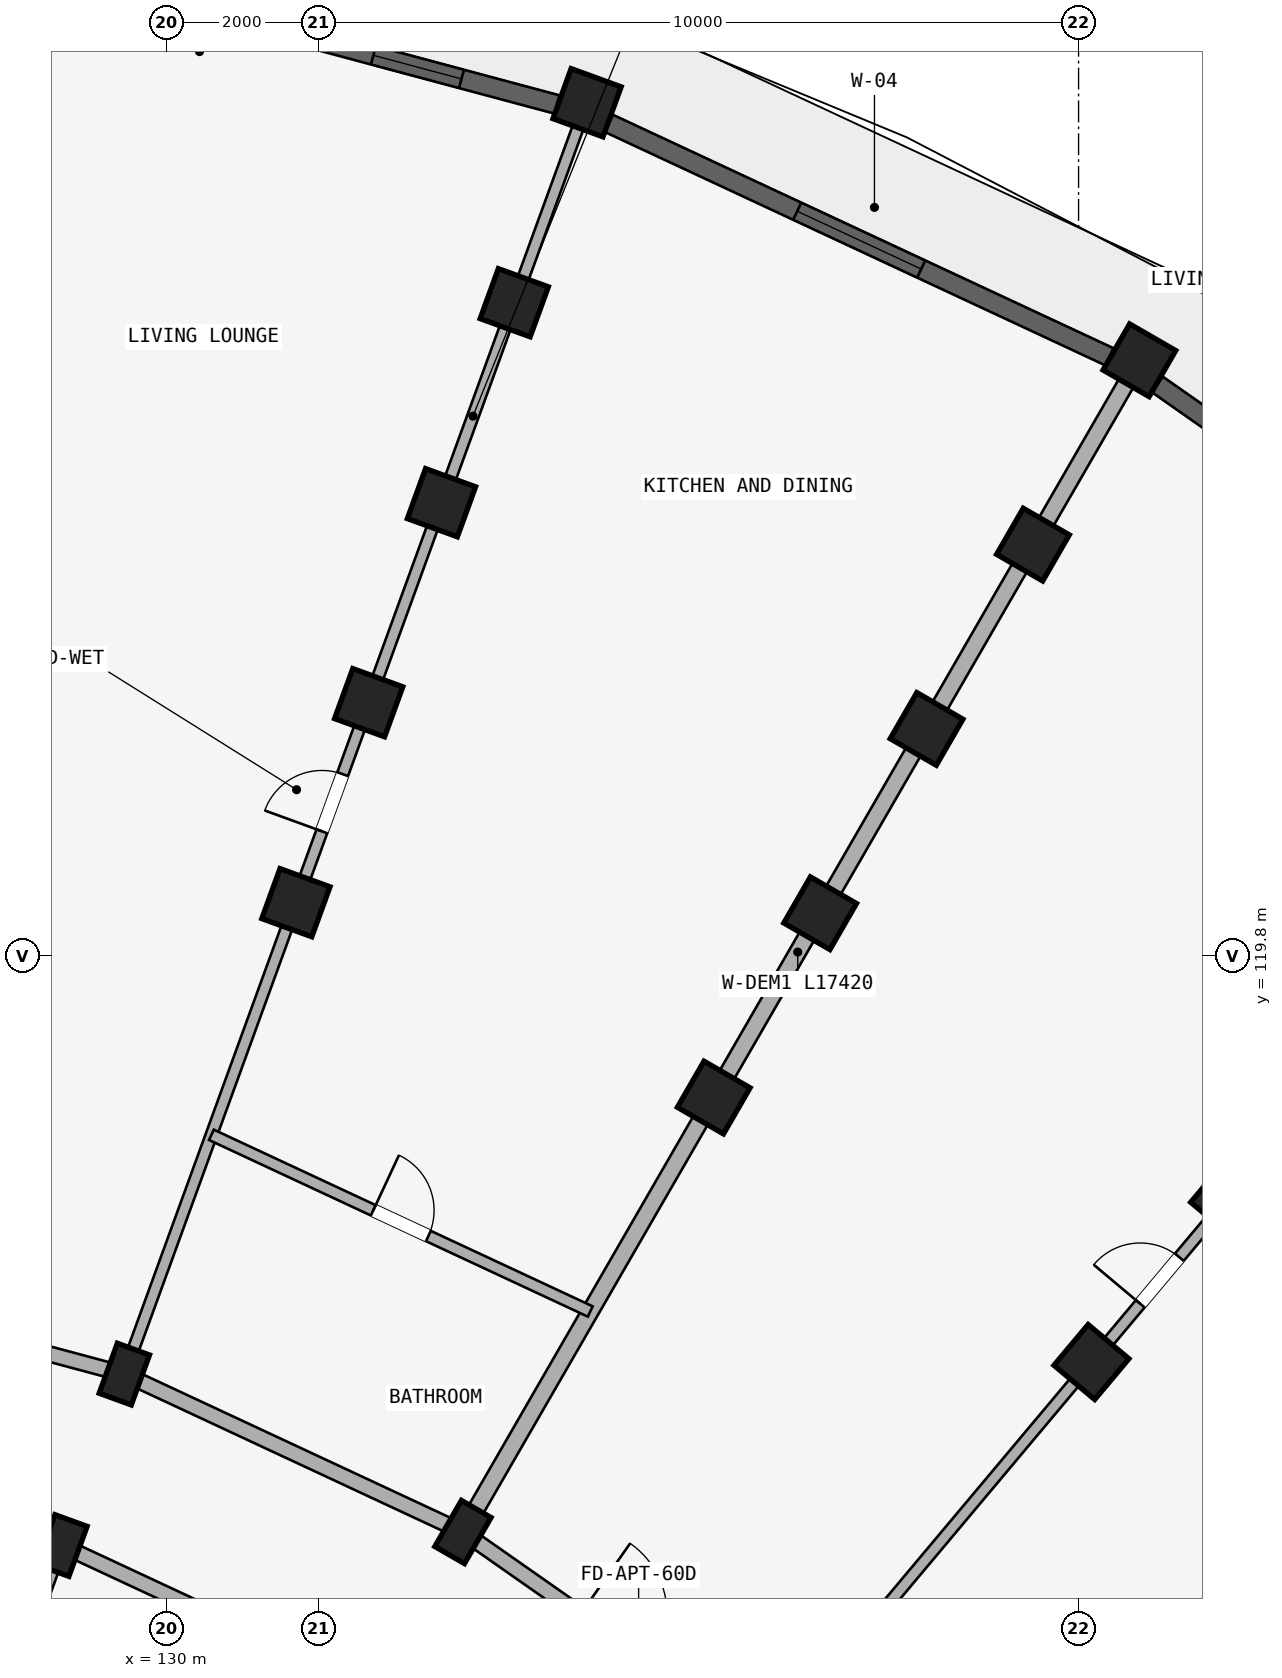
"""IFC4 building model, lengths in metres.
Left out: names, types, materials, properties, quantities, classifications, styles, units other than length and angle.
Written with IfcOpenShell. Run it as: python <this file> out.ifc"""

import sys

from ifc_helpers import new_model, si_unit, direction, frame, frame_2d, origin, origin_2d, place, context, subcontext, project, spatial, rectangle, extrude, element, fill, save


model = new_model("IFC4")
c1 = context("Model", 3, precision=1e-05, world=origin(), true_north=direction((0.0, 1.0)))
c2 = subcontext(c1, "Body", "Model", "MODEL_VIEW")
j1 = project(units=[si_unit("LENGTHUNIT", "METRE"), si_unit("PLANEANGLEUNIT", "RADIAN")], contexts=[c1])
p1 = place(None, origin())
s1 = spatial("IfcSite", under=j1, at=p1, CompositionType="ELEMENT")
p2 = place(p1, origin())
s2 = spatial("IfcBuilding", under=s1, at=p2, CompositionType="ELEMENT")
p3 = place(p2, frame((0.0, 0.0, 24.45)))
s3 = spatial("IfcBuildingStorey", under=s2, at=p3, CompositionType="ELEMENT", Elevation=24.45)
for number, where, z_axis, x_axis in (
    (1, (128.624, 112.044, 0.0), (0.0, 0.0, 1.0), (-0.94, 0.342, 0.0)),
    (2, (129.445, 114.299, 0.0), (0.0, 0.0, 1.0), (-0.94, 0.342, 0.0)),
):
    element("IfcColumn", number, at=place(p3, frame(where, z_axis=z_axis, x_axis=x_axis)), inside=s3, PredefinedType="COLUMN", context=c2, shape_type="SweptSolid", body=[
        extrude(rectangle(XDim=0.45, YDim=0.7, at=origin_2d()), origin(), (0.0, 0.0, 1.0), 2.93),
    ])
for number, where, z_axis, x_axis in (
    (3, (131.702, 120.501, 0.0), (0.0, 0.0, 1.0), (-0.94, 0.342, 0.0)),
    (4, (132.66, 123.132, 0.0), (0.0, 0.0, 1.0), (-0.94, 0.342, 0.0)),
    (5, (133.618, 125.764, 0.0), (0.0, 0.0, 1.0), (-0.94, 0.342, 0.0)),
    (6, (134.575, 128.395, 0.0), (0.0, 0.0, 1.0), (-0.94, 0.342, 0.0)),
    (7, (135.533, 131.026, 0.0), (0.0, 0.0, 1.0), (-0.94, 0.342, 0.0)),
):
    element("IfcColumn", number, at=place(p3, frame(where, z_axis=z_axis, x_axis=x_axis)), inside=s3, PredefinedType="COLUMN", context=c2, shape_type="SweptSolid", body=[
        extrude(rectangle(XDim=0.7, YDim=0.7, at=origin_2d()), origin(), (0.0, 0.0, 1.0), 2.93),
    ])
p4 = place(p3, frame((133.9, 112.222, 0.0), z_axis=(0.0, 0.0, 1.0), x_axis=(-0.866025403784, 0.5, 0.0)))
e8 = element("IfcColumn", 8, at=p4, inside=s3, PredefinedType="COLUMN", context=c2, shape_type="SweptSolid", body=[
    extrude(rectangle(XDim=0.45, YDim=0.7, at=origin_2d()), origin(), (0.0, 0.0, 1.0), 2.93),
])
for number, where, z_axis, x_axis in (
    (9, (137.2, 117.938, 0.0), (0.0, 0.0, 1.0), (-0.866, 0.5, 0.0)),
    (10, (138.6, 120.363, 0.0), (0.0, 0.0, 1.0), (-0.866, 0.5, 0.0)),
    (11, (140.0, 122.787, 0.0), (0.0, 0.0, 1.0), (-0.866, 0.5, 0.0)),
    (12, (141.4, 125.212, 0.0), (0.0, 0.0, 1.0), (-0.866, 0.5, 0.0)),
    (13, (142.8, 127.637, 0.0), (0.0, 0.0, 1.0), (-0.866, 0.5, 0.0)),
    (14, (142.169, 114.458, 0.0), (0.0, 0.0, 1.0), (-0.766, 0.643, 0.0)),
    (15, (143.969, 116.603, 0.0), (0.0, 0.0, 1.0), (-0.766, 0.643, 0.0)),
):
    element("IfcColumn", number, at=place(p3, frame(where, z_axis=z_axis, x_axis=x_axis)), inside=s3, PredefinedType="COLUMN", context=c2, shape_type="SweptSolid", body=[
        extrude(rectangle(XDim=0.7, YDim=0.7, at=origin_2d()), origin(), (0.0, 0.0, 1.0), 2.93),
    ])
p5 = place(p3, frame((124.28, 113.208, 0.0), z_axis=(0.0, 0.0, 1.0), x_axis=(0.965934240054, -0.258787642463, 0.0)))
e16 = element("IfcWall", 16, at=p5, inside=s3, PredefinedType="STANDARD", context=c2, shape_type="SweptSolid", body=[
    extrude(rectangle(XDim=4.497, YDim=0.2, at=frame_2d((2.249, 0.0))), origin(), (0.0, 0.0, 1.0), 2.372),
])
p6 = place(p3, frame((124.697, 115.572, 0.0), z_axis=(0.0, 0.0, 1.0), x_axis=(0.965930095386, -0.258803112091, 0.0)))
e17 = element("IfcWall", 17, at=p6, inside=s3, PredefinedType="STANDARD", context=c2, shape_type="SweptSolid", body=[
    extrude(rectangle(XDim=4.916, YDim=0.2, at=frame_2d((2.458, 0.0))), origin(), (0.0, 0.0, 1.0), 2.372),
])
p7 = place(p6, frame((1.918, 0.0, 0.0)))
e18 = element("IfcOpeningElement", 18, at=p7, cuts=e17, PredefinedType="OPENING", context=c2, shape_type="SweptSolid", body=[
    extrude(rectangle(XDim=1.08, YDim=2.15, at=frame_2d((0.54, 1.075))), frame((0.0, 0.11, 0.0), z_axis=(0.0, -1.0, 0.0), x_axis=(1.0, 0.0, 0.0)), (0.0, 0.0, 1.0), 0.22),
])
p8 = place(p3, frame((128.624, 112.044, 0.0), z_axis=(0.0, 0.0, 1.0), x_axis=(0.906307919131, -0.422617978463, 0.0)))
e19 = element("IfcWall", 19, at=p8, inside=s3, PredefinedType="STANDARD", context=c2, shape_type="SweptSolid", body=[
    extrude(rectangle(XDim=4.497, YDim=0.2, at=frame_2d((2.249, 0.0))), origin(), (0.0, 0.0, 1.0), 2.372),
])
p9 = place(p3, frame((129.445, 114.299, 0.0), z_axis=(0.0, 0.0, 1.0), x_axis=(0.906302381024, -0.422629854778, 0.0)))
e20 = element("IfcWall", 20, at=p9, inside=s3, PredefinedType="STANDARD", context=c2, shape_type="SweptSolid", body=[
    extrude(rectangle(XDim=4.915, YDim=0.2, at=frame_2d((2.458, 0.0))), origin(), (0.0, 0.0, 1.0), 2.372),
])
p10 = place(p3, frame((133.9, 112.222, 0.0), z_axis=(0.0, 0.0, 1.0), x_axis=(0.819140911474, -0.573592335331, 0.0)))
e21 = element("IfcWall", 21, at=p10, inside=s3, PredefinedType="STANDARD", context=c2, shape_type="SweptSolid", body=[
    extrude(rectangle(XDim=4.916, YDim=0.2, at=frame_2d((2.458, 0.0))), origin(), (0.0, 0.0, 1.0), 2.372),
])
p11 = place(p10, frame((1.888, 0.0, 0.0)))
e22 = element("IfcOpeningElement", 22, at=p11, cuts=e21, PredefinedType="OPENING", context=c2, shape_type="SweptSolid", body=[
    extrude(rectangle(XDim=1.14, YDim=2.15, at=frame_2d((0.57, 1.075))), frame((0.0, 0.11, 0.0), z_axis=(0.0, -1.0, 0.0), x_axis=(1.0, 0.0, 0.0)), (0.0, 0.0, 1.0), 0.22),
])
p12 = place(p3, frame((126.298, 105.654, 0.0), z_axis=(0.0, 0.0, 1.0), x_axis=(0.342010221662, 0.939696231917, 0.0)))
e23 = element("IfcWall", 23, at=p12, inside=s3, PredefinedType="PARTITIONING", context=c2, shape_type="SweptSolid", body=[
    extrude(rectangle(XDim=6.75, YDim=0.15, at=frame_2d((3.375, 0.0))), origin(), (0.0, 0.0, 1.0), 2.372),
])
p13 = place(p12, frame((3.242, 0.0, 0.0)))
e24 = element("IfcOpeningElement", 24, at=p13, cuts=e23, PredefinedType="OPENING", context=c2, shape_type="SweptSolid", body=[
    extrude(rectangle(XDim=0.94, YDim=2.1, at=frame_2d((0.47, 1.05))), frame((0.0, 0.085, 0.0), z_axis=(0.0, -1.0, 0.0), x_axis=(1.0, 0.0, 0.0)), (0.0, 0.0, 1.0), 0.17),
])
p14 = place(p3, frame((129.479, 114.393, 0.0), z_axis=(0.0, 0.0, 1.0), x_axis=(0.342022120477, 0.939691901159, 0.0)))
e25 = element("IfcWall", 25, at=p14, inside=s3, PredefinedType="PARTITIONING", context=c2, shape_type="SweptSolid", body=[
    extrude(rectangle(XDim=17.42, YDim=0.15, at=frame_2d((8.71, 0.0))), origin(), (0.0, 0.0, 1.0), 2.372),
])
p15 = place(p14, frame((7.5, 0.0, 0.0)))
e26 = element("IfcOpeningElement", 26, at=p15, cuts=e25, PredefinedType="OPENING", context=c2, shape_type="SweptSolid", body=[
    extrude(rectangle(XDim=0.8, YDim=2.1, at=frame_2d((0.4, 1.05))), frame((0.0, 0.085, 0.0), z_axis=(0.0, -1.0, 0.0), x_axis=(1.0, 0.0, 0.0)), (0.0, 0.0, 1.0), 0.17),
])
p16 = place(p3, frame((133.95, 112.309, 0.0), z_axis=(0.0, 0.0, 1.0), x_axis=(0.499997843263, 0.866026648973, 0.0)))
e27 = element("IfcWall", 27, at=p16, inside=s3, PredefinedType="STANDARD", context=c2, shape_type="SweptSolid", body=[
    extrude(rectangle(XDim=17.42, YDim=0.22, at=frame_2d((8.71, 0.0))), origin(), (0.0, 0.0, 1.0), 2.372),
])
p17 = place(p3, frame((137.991, 109.479, 0.0), z_axis=(0.0, 0.0, 1.0), x_axis=(0.642784757967, 0.766046835987, 0.0)))
e28 = element("IfcWall", 28, at=p17, inside=s3, PredefinedType="PARTITIONING", context=c2, shape_type="SweptSolid", body=[
    extrude(rectangle(XDim=17.42, YDim=0.15, at=frame_2d((8.71, 0.0))), origin(), (0.0, 0.0, 1.0), 2.372),
])
p18 = place(p17, frame((7.5, 0.0, 0.0)))
e29 = element("IfcOpeningElement", 29, at=p18, cuts=e28, PredefinedType="OPENING", context=c2, shape_type="SweptSolid", body=[
    extrude(rectangle(XDim=0.8, YDim=2.1, at=frame_2d((0.4, 1.05))), frame((0.0, 0.085, 0.0), z_axis=(0.0, -1.0, 0.0), x_axis=(1.0, 0.0, 0.0)), (0.0, 0.0, 1.0), 0.17),
])
p19 = place(p3, frame((141.479, 105.991, 0.0), z_axis=(0.0, 0.0, 1.0), x_axis=(0.766046835987, 0.642784757967, 0.0)))
e30 = element("IfcWall", 30, at=p19, inside=s3, PredefinedType="PARTITIONING", context=c2, shape_type="SweptSolid", body=[
    extrude(rectangle(XDim=17.42, YDim=0.15, at=frame_2d((8.71, 0.0))), origin(), (0.0, 0.0, 1.0), 2.372),
])
p20 = place(p19, frame((7.5, 0.0, 0.0)))
e31 = element("IfcOpeningElement", 31, at=p20, cuts=e30, PredefinedType="OPENING", context=c2, shape_type="SweptSolid", body=[
    extrude(rectangle(XDim=0.8, YDim=2.1, at=frame_2d((0.4, 1.05))), frame((0.0, 0.085, 0.0), z_axis=(0.0, -1.0, 0.0), x_axis=(1.0, 0.0, 0.0)), (0.0, 0.0, 1.0), 0.17),
])
p21 = place(p3, frame((130.591, 117.447, 0.0), z_axis=(0.0, 0.0, 1.0), x_axis=(0.906302189986, -0.422630264446, 0.0)))
e32 = element("IfcWall", 32, at=p21, inside=s3, PredefinedType="PLUMBINGWALL", context=c2, shape_type="SweptSolid", body=[
    extrude(rectangle(XDim=5.5, YDim=0.15, at=frame_2d((2.75, 0.0))), origin(), (0.0, 0.0, 1.0), 2.372),
])
p22 = place(p21, frame((2.35, 0.0, 0.0)))
e33 = element("IfcOpeningElement", 33, at=p22, cuts=e32, PredefinedType="OPENING", context=c2, shape_type="SweptSolid", body=[
    extrude(rectangle(XDim=0.8, YDim=2.1, at=frame_2d((0.4, 1.05))), frame((0.0, 0.085, 0.0), z_axis=(0.0, -1.0, 0.0), x_axis=(1.0, 0.0, 0.0)), (0.0, 0.0, 1.0), 0.17),
])
p23 = place(p3, frame((128.118, 132.883, 0.0), z_axis=(0.0, 0.0, 1.0), x_axis=(0.965930355787, -0.258802140196, 0.0)))
e34 = element("IfcWall", 34, at=p23, inside=s3, PredefinedType="STANDARD", context=c2, shape_type="SweptSolid", body=[
    extrude(rectangle(XDim=7.267, YDim=0.25, at=frame_2d((3.633, 0.0))), origin(), (0.0, 0.0, 1.0), 2.372),
])
p24 = place(p23, frame((4.766, 0.0, 0.422)))
e35 = element("IfcOpeningElement", 35, at=p24, cuts=e34, PredefinedType="OPENING", context=c2, shape_type="SweptSolid", body=[
    extrude(rectangle(XDim=1.2, YDim=1.5, at=frame_2d((0.6, 0.75))), frame((0.0, 0.135, 0.0), z_axis=(0.0, -1.0, 0.0), x_axis=(1.0, 0.0, 0.0)), (0.0, 0.0, 1.0), 0.27),
])
p25 = place(p23, frame((1.943, 0.0, 0.0)))
e36 = element("IfcOpeningElement", 36, at=p25, cuts=e34, PredefinedType="OPENING", context=c2, shape_type="SweptSolid", body=[
    extrude(rectangle(XDim=1.2, YDim=2.15, at=frame_2d((0.6, 1.075))), frame((0.0, 0.135, 0.0), z_axis=(0.0, -1.0, 0.0), x_axis=(1.0, 0.0, 0.0)), (0.0, 0.0, 1.0), 0.27),
])
p26 = place(p3, frame((135.821, 130.754, 0.0), z_axis=(0.0, 0.0, 1.0), x_axis=(0.90630327107, -0.422627946127, 0.0)))
e37 = element("IfcWall", 37, at=p26, inside=s3, PredefinedType="STANDARD", context=c2, shape_type="SweptSolid", body=[
    extrude(rectangle(XDim=7.267, YDim=0.25, at=frame_2d((3.633, 0.0))), origin(), (0.0, 0.0, 1.0), 2.372),
])
p27 = place(p26, frame((2.733, 0.0, 0.522)))
e38 = element("IfcOpeningElement", 38, at=p27, cuts=e37, PredefinedType="OPENING", context=c2, shape_type="SweptSolid", body=[
    extrude(rectangle(XDim=1.8, YDim=1.65, at=frame_2d((0.9, 0.825))), frame((0.0, 0.135, 0.0), z_axis=(0.0, -1.0, 0.0), x_axis=(1.0, 0.0, 0.0)), (0.0, 0.0, 1.0), 0.27),
])
p28 = place(p3, frame((143.036, 127.319, 0.0), z_axis=(0.0, 0.0, 1.0), x_axis=(0.819159308599, -0.573566061701, 0.0)))
e39 = element("IfcWall", 39, at=p28, inside=s3, PredefinedType="STANDARD", context=c2, shape_type="SweptSolid", body=[
    extrude(rectangle(XDim=7.267, YDim=0.25, at=frame_2d((3.633, 0.0))), origin(), (0.0, 0.0, 1.0), 2.372),
])
p29 = place(p28, frame((2.583, 0.0, 0.372)))
e40 = element("IfcOpeningElement", 40, at=p29, cuts=e39, PredefinedType="OPENING", context=c2, shape_type="SweptSolid", body=[
    extrude(rectangle(XDim=2.1, YDim=1.8, at=frame_2d((1.05, 0.9))), frame((0.0, 0.135, 0.0), z_axis=(0.0, -1.0, 0.0), x_axis=(1.0, 0.0, 0.0)), (0.0, 0.0, 1.0), 0.27),
])
p30 = place(p24, origin())
e41 = element("IfcWindow", 41, at=p30, inside=s3, PartitioningType="SINGLE_PANEL", PredefinedType="WINDOW", context=c2, shape_type="SweptSolid", body=[
    extrude(rectangle(XDim=1.2, YDim=1.5, at=frame_2d((0.6, 0.75))), frame((0.0, 0.03, 0.0), z_axis=(0.0, -1.0, 0.0), x_axis=(1.0, 0.0, 0.0)), (0.0, 0.0, 1.0), 0.06),
])
fill(e35, e41)
p31 = place(p27, origin())
e42 = element("IfcWindow", 42, at=p31, inside=s3, PartitioningType="DOUBLE_PANEL_VERTICAL", PredefinedType="WINDOW", context=c2, shape_type="SweptSolid", body=[
    extrude(rectangle(XDim=1.8, YDim=1.65, at=frame_2d((0.9, 0.825))), frame((0.0, 0.03, 0.0), z_axis=(0.0, -1.0, 0.0), x_axis=(1.0, 0.0, 0.0)), (0.0, 0.0, 1.0), 0.06),
])
fill(e38, e42)
p32 = place(p15, frame((0.8, 0.0, 0.0), z_axis=(0.0, 0.0, 1.0), x_axis=(-1.0, 0.0, 0.0)))
e43 = element("IfcDoor", 43, at=p32, inside=s3, OperationType="SINGLE_SWING_RIGHT", PredefinedType="DOOR", context=c2, shape_type="SweptSolid", body=[
    extrude(rectangle(XDim=0.8, YDim=2.1, at=frame_2d((0.4, 1.05))), frame((0.0, 0.025, 0.0), z_axis=(0.0, -1.0, 0.0), x_axis=(1.0, 0.0, 0.0)), (0.0, 0.0, 1.0), 0.05),
])
fill(e26, e43)
p33 = place(p18, frame((0.8, 0.0, 0.0), z_axis=(0.0, 0.0, 1.0), x_axis=(-1.0, 0.0, 0.0)))
e44 = element("IfcDoor", 44, at=p33, inside=s3, OperationType="SINGLE_SWING_RIGHT", PredefinedType="DOOR", context=c2, shape_type="SweptSolid", body=[
    extrude(rectangle(XDim=0.8, YDim=2.1, at=frame_2d((0.4, 1.05))), frame((0.0, 0.025, 0.0), z_axis=(0.0, -1.0, 0.0), x_axis=(1.0, 0.0, 0.0)), (0.0, 0.0, 1.0), 0.05),
])
fill(e29, e44)
p34 = place(p22, origin())
e45 = element("IfcDoor", 45, at=p34, inside=s3, OperationType="SINGLE_SWING_LEFT", PredefinedType="DOOR", context=c2, shape_type="SweptSolid", body=[
    extrude(rectangle(XDim=0.8, YDim=2.1, at=frame_2d((0.4, 1.05))), frame((0.0, 0.025, 0.0), z_axis=(0.0, -1.0, 0.0), x_axis=(1.0, 0.0, 0.0)), (0.0, 0.0, 1.0), 0.05),
])
fill(e33, e45)
save(model, sys.argv[1])
